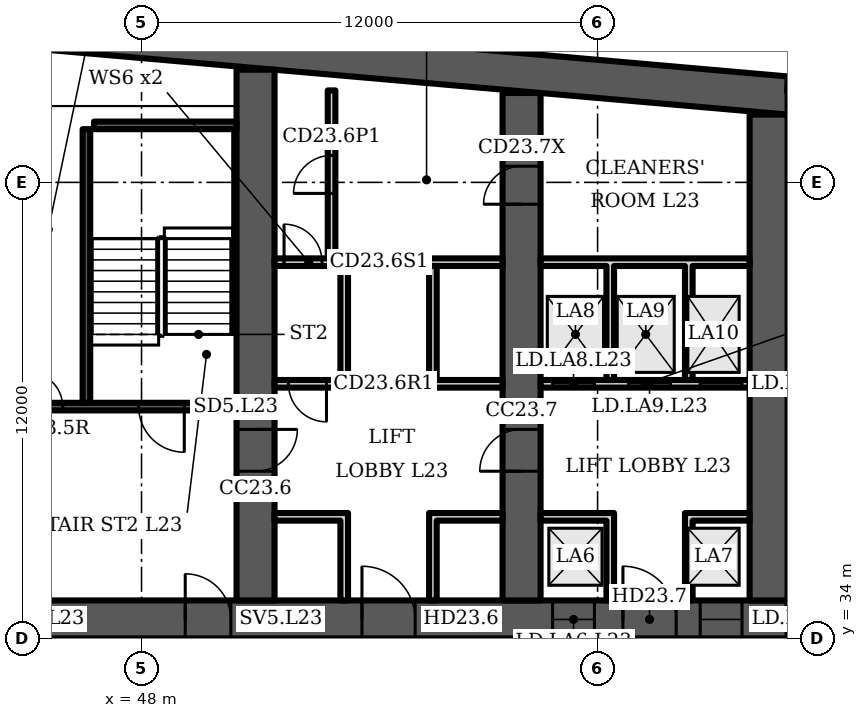
"""IFC4 building model, lengths in metres.
Left out: names, types, materials, properties, quantities, classifications, styles, units other than length and angle.
Written with IfcOpenShell. Run it as: python <this file> out.ifc"""

import sys

from ifc_helpers import new_model, si_unit, direction, frame, frame_2d, origin, place, context, subcontext, project, spatial, polyline, rectangle, outline, extrude, element, fill, save


model = new_model("IFC4")
c1 = context("Model", 3, precision=1e-05, world=origin(), true_north=direction((0.0, 1.0)))
c2 = subcontext(c1, "Body", "Model", "MODEL_VIEW")
j1 = project(units=[si_unit("LENGTHUNIT", "METRE"), si_unit("PLANEANGLEUNIT", "RADIAN")], contexts=[c1])
p1 = place(None, origin())
s1 = spatial("IfcSite", under=j1, at=p1, CompositionType="ELEMENT")
p2 = place(p1, origin())
s2 = spatial("IfcBuilding", under=s1, at=p2, CompositionType="ELEMENT")
p3 = place(p2, frame((0.0, 0.0, 103.9)))
s3 = spatial("IfcBuildingStorey", under=s2, at=p3, CompositionType="ELEMENT", Elevation=103.9)
p4 = place(p3, origin())
e1 = element("IfcWall", 1, at=p4, inside=s3, PredefinedType="SHEAR", context=c2, shape_type="SweptSolid", body=[
    extrude(outline(polyline([(16.0, 47.784), (40.5, 49.927), (65.0, 47.784), (65.0, 48.787), (40.5, 50.931), (16.0, 48.787), (16.0, 47.784)])), origin(), (0.0, 0.0, 1.0), 3.6),
])
p5 = place(p3, frame((16.0, 34.5, 0.0), z_axis=(0.0, 0.0, 1.0), x_axis=(1.0, 0.0, 0.0)))
e2 = element("IfcWall", 2, at=p5, inside=s3, PredefinedType="SHEAR", context=c2, shape_type="SweptSolid", body=[
    extrude(rectangle(XDim=49.0, YDim=1.0, at=frame_2d((24.5, 0.0))), origin(), (0.0, 0.0, 1.0), 3.6),
])
p6 = place(p5, frame((1.2, 0.0, 0.0)))
e3 = element("IfcOpeningElement", 3, at=p6, cuts=e2, PredefinedType="OPENING", context=c2, shape_type="SweptSolid", body=[
    extrude(rectangle(XDim=1.1, YDim=2.1, at=frame_2d((0.55, 1.05))), frame((0.0, 0.51, 0.0), z_axis=(0.0, -1.0, 0.0), x_axis=(1.0, 0.0, 0.0)), (0.0, 0.0, 1.0), 1.02),
])
p7 = place(p5, frame((5.083, 0.0, 0.0)))
e4 = element("IfcOpeningElement", 4, at=p7, cuts=e2, PredefinedType="OPENING", context=c2, shape_type="SweptSolid", body=[
    extrude(rectangle(XDim=1.1, YDim=2.1, at=frame_2d((0.55, 1.05))), frame((0.0, 0.51, 0.0), z_axis=(0.0, -1.0, 0.0), x_axis=(1.0, 0.0, 0.0)), (0.0, 0.0, 1.0), 1.02),
])
p8 = place(p5, frame((2.933, 0.0, 0.0)))
e5 = element("IfcOpeningElement", 5, at=p8, cuts=e2, PredefinedType="OPENING", context=c2, shape_type="SweptSolid", body=[
    extrude(rectangle(XDim=1.4, YDim=2.1, at=frame_2d((0.7, 1.05))), frame((0.0, 0.51, 0.0), z_axis=(0.0, -1.0, 0.0), x_axis=(1.0, 0.0, 0.0)), (0.0, 0.0, 1.0), 1.02),
])
p9 = place(p5, frame((7.65, 0.0, 0.0)))
e6 = element("IfcOpeningElement", 6, at=p9, cuts=e2, PredefinedType="OPENING", context=c2, shape_type="SweptSolid", body=[
    extrude(rectangle(XDim=1.2, YDim=2.1, at=frame_2d((0.6, 1.05))), frame((0.0, 0.51, 0.0), z_axis=(0.0, -1.0, 0.0), x_axis=(1.0, 0.0, 0.0)), (0.0, 0.0, 1.0), 1.02),
])
p10 = place(p5, frame((14.817, 0.0, 0.0)))
e7 = element("IfcOpeningElement", 7, at=p10, cuts=e2, PredefinedType="OPENING", context=c2, shape_type="SweptSolid", body=[
    extrude(rectangle(XDim=1.1, YDim=2.1, at=frame_2d((0.55, 1.05))), frame((0.0, 0.51, 0.0), z_axis=(0.0, -1.0, 0.0), x_axis=(1.0, 0.0, 0.0)), (0.0, 0.0, 1.0), 1.02),
])
p11 = place(p5, frame((19.083, 0.0, 0.0)))
e8 = element("IfcOpeningElement", 8, at=p11, cuts=e2, PredefinedType="OPENING", context=c2, shape_type="SweptSolid", body=[
    extrude(rectangle(XDim=1.1, YDim=2.1, at=frame_2d((0.55, 1.05))), frame((0.0, 0.51, 0.0), z_axis=(0.0, -1.0, 0.0), x_axis=(1.0, 0.0, 0.0)), (0.0, 0.0, 1.0), 1.02),
])
p12 = place(p5, frame((16.8, 0.0, 0.0)))
e9 = element("IfcOpeningElement", 9, at=p12, cuts=e2, PredefinedType="OPENING", context=c2, shape_type="SweptSolid", body=[
    extrude(rectangle(XDim=1.4, YDim=2.1, at=frame_2d((0.7, 1.05))), frame((0.0, 0.51, 0.0), z_axis=(0.0, -1.0, 0.0), x_axis=(1.0, 0.0, 0.0)), (0.0, 0.0, 1.0), 1.02),
])
p13 = place(p5, frame((21.817, 0.0, 0.0)))
e10 = element("IfcOpeningElement", 10, at=p13, cuts=e2, PredefinedType="OPENING", context=c2, shape_type="SweptSolid", body=[
    extrude(rectangle(XDim=1.1, YDim=2.1, at=frame_2d((0.55, 1.05))), frame((0.0, 0.51, 0.0), z_axis=(0.0, -1.0, 0.0), x_axis=(1.0, 0.0, 0.0)), (0.0, 0.0, 1.0), 1.02),
])
p14 = place(p5, frame((26.083, 0.0, 0.0)))
e11 = element("IfcOpeningElement", 11, at=p14, cuts=e2, PredefinedType="OPENING", context=c2, shape_type="SweptSolid", body=[
    extrude(rectangle(XDim=1.1, YDim=2.1, at=frame_2d((0.55, 1.05))), frame((0.0, 0.51, 0.0), z_axis=(0.0, -1.0, 0.0), x_axis=(1.0, 0.0, 0.0)), (0.0, 0.0, 1.0), 1.02),
])
p15 = place(p5, frame((33.15, 0.0, 0.0)))
e12 = element("IfcOpeningElement", 12, at=p15, cuts=e2, PredefinedType="OPENING", context=c2, shape_type="SweptSolid", body=[
    extrude(rectangle(XDim=1.2, YDim=2.1, at=frame_2d((0.6, 1.05))), frame((0.0, 0.51, 0.0), z_axis=(0.0, -1.0, 0.0), x_axis=(1.0, 0.0, 0.0)), (0.0, 0.0, 1.0), 1.02),
])
p16 = place(p5, frame((37.8, 0.0, 0.0)))
e13 = element("IfcOpeningElement", 13, at=p16, cuts=e2, PredefinedType="OPENING", context=c2, shape_type="SweptSolid", body=[
    extrude(rectangle(XDim=1.4, YDim=2.1, at=frame_2d((0.7, 1.05))), frame((0.0, 0.51, 0.0), z_axis=(0.0, -1.0, 0.0), x_axis=(1.0, 0.0, 0.0)), (0.0, 0.0, 1.0), 1.02),
])
p17 = place(p5, frame((42.817, 0.0, 0.0)))
e14 = element("IfcOpeningElement", 14, at=p17, cuts=e2, PredefinedType="OPENING", context=c2, shape_type="SweptSolid", body=[
    extrude(rectangle(XDim=1.1, YDim=2.1, at=frame_2d((0.55, 1.05))), frame((0.0, 0.51, 0.0), z_axis=(0.0, -1.0, 0.0), x_axis=(1.0, 0.0, 0.0)), (0.0, 0.0, 1.0), 1.02),
])
p18 = place(p5, frame((46.7, 0.0, 0.0)))
e15 = element("IfcOpeningElement", 15, at=p18, cuts=e2, PredefinedType="OPENING", context=c2, shape_type="SweptSolid", body=[
    extrude(rectangle(XDim=1.1, YDim=2.1, at=frame_2d((0.55, 1.05))), frame((0.0, 0.51, 0.0), z_axis=(0.0, -1.0, 0.0), x_axis=(1.0, 0.0, 0.0)), (0.0, 0.0, 1.0), 1.02),
])
p19 = place(p5, frame((44.667, 0.0, 0.0)))
e16 = element("IfcOpeningElement", 16, at=p19, cuts=e2, PredefinedType="OPENING", context=c2, shape_type="SweptSolid", body=[
    extrude(rectangle(XDim=1.4, YDim=2.1, at=frame_2d((0.7, 1.05))), frame((0.0, 0.51, 0.0), z_axis=(0.0, -1.0, 0.0), x_axis=(1.0, 0.0, 0.0)), (0.0, 0.0, 1.0), 1.02),
])
p20 = place(p3, frame((51.0, 35.0, 0.0), z_axis=(0.0, 0.0, 1.0), x_axis=(0.0, 1.0, 0.0)))
e17 = element("IfcWall", 17, at=p20, inside=s3, PredefinedType="SHEAR", context=c2, shape_type="SweptSolid", body=[
    extrude(rectangle(XDim=13.965, YDim=1.0, at=frame_2d((6.982, 0.0))), origin(), (0.0, 0.0, 1.0), 3.6),
])
p21 = place(p20, frame((3.4, 0.0, 0.0)))
e18 = element("IfcOpeningElement", 18, at=p21, cuts=e17, PredefinedType="OPENING", context=c2, shape_type="SweptSolid", body=[
    extrude(rectangle(XDim=1.1, YDim=2.1, at=frame_2d((0.55, 1.05))), frame((0.0, 0.51, 0.0), z_axis=(0.0, -1.0, 0.0), x_axis=(1.0, 0.0, 0.0)), (0.0, 0.0, 1.0), 1.02),
])
p22 = place(p3, frame((58.0, 35.0, 0.0), z_axis=(0.0, 0.0, 1.0), x_axis=(0.0, 1.0, 0.0)))
e19 = element("IfcWall", 19, at=p22, inside=s3, PredefinedType="SHEAR", context=c2, shape_type="SweptSolid", body=[
    extrude(rectangle(XDim=13.352, YDim=1.0, at=frame_2d((6.676, 0.0))), origin(), (0.0, 0.0, 1.0), 3.6),
])
p23 = place(p22, frame((10.426, 0.0, 0.0)))
e20 = element("IfcOpeningElement", 20, at=p23, cuts=e19, PredefinedType="OPENING", context=c2, shape_type="SweptSolid", body=[
    extrude(rectangle(XDim=1.0, YDim=2.1, at=frame_2d((0.5, 1.05))), frame((0.0, 0.51, 0.0), z_axis=(0.0, -1.0, 0.0), x_axis=(1.0, 0.0, 0.0)), (0.0, 0.0, 1.0), 1.02),
])
p24 = place(p22, frame((3.4, 0.0, 0.0)))
e21 = element("IfcOpeningElement", 21, at=p24, cuts=e19, PredefinedType="OPENING", context=c2, shape_type="SweptSolid", body=[
    extrude(rectangle(XDim=1.1, YDim=2.1, at=frame_2d((0.55, 1.05))), frame((0.0, 0.51, 0.0), z_axis=(0.0, -1.0, 0.0), x_axis=(1.0, 0.0, 0.0)), (0.0, 0.0, 1.0), 1.02),
])
p25 = place(p3, frame((64.5, 35.0, 0.0), z_axis=(0.0, 0.0, 1.0), x_axis=(0.0, 1.0, 0.0)))
e22 = element("IfcWall", 22, at=p25, inside=s3, PredefinedType="SHEAR", context=c2, shape_type="SweptSolid", body=[
    extrude(rectangle(XDim=12.784, YDim=1.0, at=frame_2d((6.392, 0.0))), origin(), (0.0, 0.0, 1.0), 3.6),
])
p26 = place(p3, frame((67.983, 48.326, 0.0), z_axis=(0.0, 0.0, 1.0), x_axis=(-0.996194, 0.087168, 0.0)))
e23 = element("IfcWall", 23, at=p26, inside=s3, PredefinedType="SOLIDWALL", context=c2, shape_type="SweptSolid", body=[
    extrude(rectangle(XDim=2.994, YDim=0.4, at=frame_2d((1.497, 0.0))), origin(), (0.0, 0.0, 1.0), 3.2),
])
p27 = place(p3, frame((44.5, 40.1, 0.0), z_axis=(0.0, 0.0, 1.0), x_axis=(1.0, 0.0, 0.0)))
e24 = element("IfcWall", 24, at=p27, inside=s3, PredefinedType="SHEAR", context=c2, shape_type="SweptSolid", body=[
    extrude(rectangle(XDim=6.0, YDim=0.2, at=frame_2d((3.0, 0.0))), origin(), (0.0, 0.0, 1.0), 3.2),
])
p28 = place(p27, frame((3.425, 0.0, 0.0)))
e25 = element("IfcOpeningElement", 25, at=p28, cuts=e24, PredefinedType="OPENING", context=c2, shape_type="SweptSolid", body=[
    extrude(rectangle(XDim=1.2, YDim=2.1, at=frame_2d((0.6, 1.05))), frame((0.0, 0.11, 0.0), z_axis=(0.0, -1.0, 0.0), x_axis=(1.0, 0.0, 0.0)), (0.0, 0.0, 1.0), 0.22),
])
p29 = place(p27, frame((0.525, 0.0, 0.0)))
e26 = element("IfcOpeningElement", 26, at=p29, cuts=e24, PredefinedType="OPENING", context=c2, shape_type="SweptSolid", body=[
    extrude(rectangle(XDim=0.9, YDim=2.1, at=frame_2d((0.45, 1.05))), frame((0.0, 0.11, 0.0), z_axis=(0.0, -1.0, 0.0), x_axis=(1.0, 0.0, 0.0)), (0.0, 0.0, 1.0), 0.22),
])
p30 = place(p3, frame((46.55, 40.2, 0.0), z_axis=(0.0, 0.0, 1.0), x_axis=(0.0, 1.0, 0.0)))
e27 = element("IfcWall", 27, at=p30, inside=s3, PredefinedType="SHEAR", context=c2, shape_type="SweptSolid", body=[
    extrude(rectangle(XDim=7.2, YDim=0.2, at=frame_2d((3.6, 0.0))), origin(), (0.0, 0.0, 1.0), 3.2),
])
p31 = place(p3, frame((46.75, 47.5, 0.0), z_axis=(0.0, 0.0, 1.0), x_axis=(1.0, 0.0, 0.0)))
e28 = element("IfcWall", 28, at=p31, inside=s3, PredefinedType="SHEAR", context=c2, shape_type="SweptSolid", body=[
    extrude(rectangle(XDim=3.75, YDim=0.2, at=frame_2d((1.875, 0.0))), origin(), (0.0, 0.0, 1.0), 3.2),
])
p32 = place(p3, frame((51.5, 40.7, 0.0), z_axis=(0.0, 0.0, 1.0), x_axis=(1.0, 0.0, 0.0)))
e29 = element("IfcWall", 29, at=p32, inside=s3, PredefinedType="PARTITIONING", context=c2, shape_type="SweptSolid", body=[
    extrude(rectangle(XDim=6.0, YDim=0.2, at=frame_2d((3.0, 0.0))), origin(), (0.0, 0.0, 1.0), 3.2),
])
p33 = place(p32, frame((0.367, 0.0, 0.0)))
e30 = element("IfcOpeningElement", 30, at=p33, cuts=e29, PredefinedType="OPENING", context=c2, shape_type="SweptSolid", body=[
    extrude(rectangle(XDim=1.0, YDim=2.1, at=frame_2d((0.5, 1.05))), frame((0.0, 0.11, 0.0), z_axis=(0.0, -1.0, 0.0), x_axis=(1.0, 0.0, 0.0)), (0.0, 0.0, 1.0), 0.22),
])
p34 = place(p3, frame((51.5, 43.9, 0.0), z_axis=(0.0, 0.0, 1.0), x_axis=(1.0, 0.0, 0.0)))
e31 = element("IfcWall", 31, at=p34, inside=s3, PredefinedType="PARTITIONING", context=c2, shape_type="SweptSolid", body=[
    extrude(rectangle(XDim=6.0, YDim=0.2, at=frame_2d((3.0, 0.0))), origin(), (0.0, 0.0, 1.0), 3.2),
])
p35 = place(p34, frame((0.25, 0.0, 0.0)))
e32 = element("IfcOpeningElement", 32, at=p35, cuts=e31, PredefinedType="OPENING", context=c2, shape_type="SweptSolid", body=[
    extrude(rectangle(XDim=1.0, YDim=2.1, at=frame_2d((0.5, 1.05))), frame((0.0, 0.11, 0.0), z_axis=(0.0, -1.0, 0.0), x_axis=(1.0, 0.0, 0.0)), (0.0, 0.0, 1.0), 0.22),
])
p36 = place(p3, origin())
e33 = element("IfcWall", 33, at=p36, inside=s3, PredefinedType="PARTITIONING", context=c2, shape_type="SweptSolid", body=[
    extrude(outline(polyline([(53.233, 37.1), (51.5, 37.1), (51.5, 37.3), (53.233, 37.3), (53.433, 37.3), (53.433, 35.0), (53.233, 35.0), (53.233, 37.1)])), origin(), (0.0, 0.0, 1.0), 3.2),
])
p37 = place(p3, origin())
e34 = element("IfcWall", 34, at=p37, inside=s3, PredefinedType="PARTITIONING", context=c2, shape_type="SweptSolid", body=[
    extrude(outline(polyline([(55.567, 37.3), (55.767, 37.3), (57.5, 37.3), (57.5, 37.1), (55.767, 37.1), (55.767, 35.0), (55.567, 35.0), (55.567, 37.3)])), origin(), (0.0, 0.0, 1.0), 3.2),
])
p38 = place(p3, origin())
e35 = element("IfcWall", 35, at=p38, inside=s3, PredefinedType="PARTITIONING", context=c2, shape_type="SweptSolid", body=[
    extrude(outline(polyline([(53.233, 40.8), (53.233, 43.8), (53.433, 43.8), (53.433, 40.8), (53.233, 40.8)])), origin(), (0.0, 0.0, 1.0), 3.2),
])
p39 = place(p3, origin())
e36 = element("IfcWall", 36, at=p39, inside=s3, PredefinedType="PARTITIONING", context=c2, shape_type="SweptSolid", body=[
    extrude(outline(polyline([(55.567, 40.8), (55.567, 43.8), (55.767, 43.8), (55.767, 40.8), (55.567, 40.8)])), origin(), (0.0, 0.0, 1.0), 3.2),
])
p40 = place(p3, frame((53.0, 44.0, 0.0), z_axis=(0.0, 0.0, 1.0), x_axis=(0.0, 1.0, 0.0)))
e37 = element("IfcWall", 37, at=p40, inside=s3, PredefinedType="PARTITIONING", context=c2, shape_type="SweptSolid", body=[
    extrude(rectangle(XDim=4.42, YDim=0.2, at=frame_2d((2.21, 0.0))), origin(), (0.0, 0.0, 1.0), 3.2),
])
p41 = place(p40, frame((1.71, 0.0, 0.0)))
e38 = element("IfcOpeningElement", 38, at=p41, cuts=e37, PredefinedType="OPENING", context=c2, shape_type="SweptSolid", body=[
    extrude(rectangle(XDim=1.0, YDim=2.1, at=frame_2d((0.5, 1.05))), frame((0.0, 0.11, 0.0), z_axis=(0.0, -1.0, 0.0), x_axis=(1.0, 0.0, 0.0)), (0.0, 0.0, 1.0), 0.22),
])
p42 = place(p3, frame((58.5, 40.7, 0.0), z_axis=(0.0, 0.0, 1.0), x_axis=(1.0, 0.0, 0.0)))
e39 = element("IfcWall", 39, at=p42, inside=s3, PredefinedType="PARTITIONING", context=c2, shape_type="SweptSolid", body=[
    extrude(rectangle(XDim=5.5, YDim=0.2, at=frame_2d((2.75, 0.0))), origin(), (0.0, 0.0, 1.0), 3.2),
])
p43 = place(p42, frame((0.317, 0.0, 0.0)))
e40 = element("IfcOpeningElement", 40, at=p43, cuts=e39, PredefinedType="OPENING", context=c2, shape_type="SweptSolid", body=[
    extrude(rectangle(XDim=1.1, YDim=2.1, at=frame_2d((0.55, 1.05))), frame((0.0, 0.11, 0.0), z_axis=(0.0, -1.0, 0.0), x_axis=(1.0, 0.0, 0.0)), (0.0, 0.0, 1.0), 0.22),
])
p44 = place(p42, frame((2.317, 0.0, 0.0)))
e41 = element("IfcOpeningElement", 41, at=p44, cuts=e39, PredefinedType="OPENING", context=c2, shape_type="SweptSolid", body=[
    extrude(rectangle(XDim=1.1, YDim=2.1, at=frame_2d((0.55, 1.05))), frame((0.0, 0.11, 0.0), z_axis=(0.0, -1.0, 0.0), x_axis=(1.0, 0.0, 0.0)), (0.0, 0.0, 1.0), 0.22),
])
p45 = place(p42, frame((4.2, 0.0, 0.0)))
e42 = element("IfcOpeningElement", 42, at=p45, cuts=e39, PredefinedType="OPENING", context=c2, shape_type="SweptSolid", body=[
    extrude(rectangle(XDim=1.1, YDim=2.1, at=frame_2d((0.55, 1.05))), frame((0.0, 0.11, 0.0), z_axis=(0.0, -1.0, 0.0), x_axis=(1.0, 0.0, 0.0)), (0.0, 0.0, 1.0), 0.22),
])
p46 = place(p3, origin())
e43 = element("IfcWall", 43, at=p46, inside=s3, PredefinedType="PARTITIONING", context=c2, shape_type="SweptSolid", body=[
    extrude(outline(polyline([(60.233, 37.1), (58.5, 37.1), (58.5, 37.3), (60.233, 37.3), (60.433, 37.3), (60.433, 35.0), (60.233, 35.0), (60.233, 37.1)])), origin(), (0.0, 0.0, 1.0), 3.2),
])
p47 = place(p3, origin())
e44 = element("IfcWall", 44, at=p47, inside=s3, PredefinedType="PARTITIONING", context=c2, shape_type="SweptSolid", body=[
    extrude(outline(polyline([(62.3, 37.3), (62.5, 37.3), (64.0, 37.3), (64.0, 37.1), (62.5, 37.1), (62.5, 35.0), (62.3, 35.0), (62.3, 37.3)])), origin(), (0.0, 0.0, 1.0), 3.2),
])
p48 = place(p3, origin())
e45 = element("IfcWall", 45, at=p48, inside=s3, PredefinedType="PARTITIONING", context=c2, shape_type="SweptSolid", body=[
    extrude(outline(polyline([(60.433, 40.8), (60.233, 40.8), (60.233, 43.8), (58.5, 43.8), (58.5, 44.0), (64.0, 44.0), (64.0, 43.8), (62.5, 43.8), (62.5, 40.8), (62.3, 40.8), (62.3, 43.8), (60.433, 43.8), (60.433, 40.8)])), origin(), (0.0, 0.0, 1.0), 3.2),
])
p49 = place(p28, origin())
e46 = element("IfcDoor", 46, at=p49, inside=s3, OperationType="SINGLE_SWING_RIGHT", PredefinedType="DOOR", context=c2, shape_type="SweptSolid", body=[
    extrude(rectangle(XDim=1.2, YDim=2.1, at=frame_2d((0.6, 1.05))), frame((0.0, 0.025, 0.0), z_axis=(0.0, -1.0, 0.0), x_axis=(1.0, 0.0, 0.0)), (0.0, 0.0, 1.0), 0.05),
])
fill(e25, e46)
p50 = place(p29, origin())
e47 = element("IfcDoor", 47, at=p50, inside=s3, OperationType="SINGLE_SWING_LEFT", PredefinedType="DOOR", context=c2, shape_type="SweptSolid", body=[
    extrude(rectangle(XDim=0.9, YDim=2.1, at=frame_2d((0.45, 1.05))), frame((0.0, 0.025, 0.0), z_axis=(0.0, -1.0, 0.0), x_axis=(1.0, 0.0, 0.0)), (0.0, 0.0, 1.0), 0.05),
])
fill(e26, e47)
p51 = place(p15, origin())
e48 = element("IfcDoor", 48, at=p51, inside=s3, OperationType="SINGLE_SWING_LEFT", PredefinedType="DOOR", context=c2, shape_type="SweptSolid", body=[
    extrude(rectangle(XDim=1.2, YDim=2.1, at=frame_2d((0.6, 1.05))), frame((0.0, 0.025, 0.0), z_axis=(0.0, -1.0, 0.0), x_axis=(1.0, 0.0, 0.0)), (0.0, 0.0, 1.0), 0.05),
])
fill(e12, e48)
p52 = place(p16, origin())
e49 = element("IfcDoor", 49, at=p52, inside=s3, OperationType="DOUBLE_DOOR_SINGLE_SWING", PredefinedType="DOOR", context=c2, shape_type="SweptSolid", body=[
    extrude(rectangle(XDim=1.4, YDim=2.1, at=frame_2d((0.7, 1.05))), frame((0.0, 0.025, 0.0), z_axis=(0.0, -1.0, 0.0), x_axis=(1.0, 0.0, 0.0)), (0.0, 0.0, 1.0), 0.05),
])
fill(e13, e49)
p53 = place(p33, origin())
e50 = element("IfcDoor", 50, at=p53, inside=s3, OperationType="SINGLE_SWING_RIGHT", PredefinedType="DOOR", context=c2, shape_type="SweptSolid", body=[
    extrude(rectangle(XDim=1.0, YDim=2.1, at=frame_2d((0.5, 1.05))), frame((0.0, 0.025, 0.0), z_axis=(0.0, -1.0, 0.0), x_axis=(1.0, 0.0, 0.0)), (0.0, 0.0, 1.0), 0.05),
])
fill(e30, e50)
p54 = place(p35, origin())
e51 = element("IfcDoor", 51, at=p54, inside=s3, OperationType="SINGLE_SWING_LEFT", PredefinedType="DOOR", context=c2, shape_type="SweptSolid", body=[
    extrude(rectangle(XDim=1.0, YDim=2.1, at=frame_2d((0.5, 1.05))), frame((0.0, 0.025, 0.0), z_axis=(0.0, -1.0, 0.0), x_axis=(1.0, 0.0, 0.0)), (0.0, 0.0, 1.0), 0.05),
])
fill(e32, e51)
p55 = place(p41, origin())
e52 = element("IfcDoor", 52, at=p55, inside=s3, OperationType="SINGLE_SWING_LEFT", PredefinedType="DOOR", context=c2, shape_type="SweptSolid", body=[
    extrude(rectangle(XDim=1.0, YDim=2.1, at=frame_2d((0.5, 1.05))), frame((0.0, 0.025, 0.0), z_axis=(0.0, -1.0, 0.0), x_axis=(1.0, 0.0, 0.0)), (0.0, 0.0, 1.0), 0.05),
])
fill(e38, e52)
p56 = place(p17, origin())
e53 = element("IfcDoor", 53, at=p56, inside=s3, OperationType="DOUBLE_DOOR_SLIDING", PredefinedType="DOOR", context=c2, shape_type="SweptSolid", body=[
    extrude(rectangle(XDim=1.1, YDim=2.1, at=frame_2d((0.55, 1.05))), frame((0.0, 0.025, 0.0), z_axis=(0.0, -1.0, 0.0), x_axis=(1.0, 0.0, 0.0)), (0.0, 0.0, 1.0), 0.05),
])
fill(e14, e53)
p57 = place(p18, origin())
e54 = element("IfcDoor", 54, at=p57, inside=s3, OperationType="DOUBLE_DOOR_SLIDING", PredefinedType="DOOR", context=c2, shape_type="SweptSolid", body=[
    extrude(rectangle(XDim=1.1, YDim=2.1, at=frame_2d((0.55, 1.05))), frame((0.0, 0.025, 0.0), z_axis=(0.0, -1.0, 0.0), x_axis=(1.0, 0.0, 0.0)), (0.0, 0.0, 1.0), 0.05),
])
fill(e15, e54)
p58 = place(p19, origin())
e55 = element("IfcDoor", 55, at=p58, inside=s3, OperationType="DOUBLE_DOOR_SINGLE_SWING", PredefinedType="DOOR", context=c2, shape_type="SweptSolid", body=[
    extrude(rectangle(XDim=1.4, YDim=2.1, at=frame_2d((0.7, 1.05))), frame((0.0, 0.025, 0.0), z_axis=(0.0, -1.0, 0.0), x_axis=(1.0, 0.0, 0.0)), (0.0, 0.0, 1.0), 0.05),
])
fill(e16, e55)
p59 = place(p43, origin())
e56 = element("IfcDoor", 56, at=p59, inside=s3, OperationType="DOUBLE_DOOR_SLIDING", PredefinedType="DOOR", context=c2, shape_type="SweptSolid", body=[
    extrude(rectangle(XDim=1.1, YDim=2.1, at=frame_2d((0.55, 1.05))), frame((0.0, 0.025, 0.0), z_axis=(0.0, -1.0, 0.0), x_axis=(1.0, 0.0, 0.0)), (0.0, 0.0, 1.0), 0.05),
])
fill(e40, e56)
p60 = place(p44, origin())
e57 = element("IfcDoor", 57, at=p60, inside=s3, OperationType="DOUBLE_DOOR_SLIDING", PredefinedType="DOOR", context=c2, shape_type="SweptSolid", body=[
    extrude(rectangle(XDim=1.1, YDim=2.1, at=frame_2d((0.55, 1.05))), frame((0.0, 0.025, 0.0), z_axis=(0.0, -1.0, 0.0), x_axis=(1.0, 0.0, 0.0)), (0.0, 0.0, 1.0), 0.05),
])
fill(e41, e57)
p61 = place(p45, origin())
e58 = element("IfcDoor", 58, at=p61, inside=s3, OperationType="DOUBLE_DOOR_SLIDING", PredefinedType="DOOR", context=c2, shape_type="SweptSolid", body=[
    extrude(rectangle(XDim=1.1, YDim=2.1, at=frame_2d((0.55, 1.05))), frame((0.0, 0.025, 0.0), z_axis=(0.0, -1.0, 0.0), x_axis=(1.0, 0.0, 0.0)), (0.0, 0.0, 1.0), 0.05),
])
fill(e42, e58)
p62 = place(p23, origin())
e59 = element("IfcDoor", 59, at=p62, inside=s3, OperationType="SINGLE_SWING_LEFT", PredefinedType="DOOR", context=c2, shape_type="SweptSolid", body=[
    extrude(rectangle(XDim=1.0, YDim=2.1, at=frame_2d((0.5, 1.05))), frame((0.0, 0.5, 0.0), z_axis=(0.0, -1.0, 0.0), x_axis=(1.0, 0.0, 0.0)), (0.0, 0.0, 1.0), 1.0),
])
fill(e20, e59)
p63 = place(p21, origin())
e60 = element("IfcDoor", 60, at=p63, inside=s3, OperationType="SINGLE_SWING_RIGHT", PredefinedType="DOOR", context=c2, shape_type="SweptSolid", body=[
    extrude(rectangle(XDim=1.1, YDim=2.1, at=frame_2d((0.55, 1.05))), frame((0.0, 0.025, 0.0), z_axis=(0.0, -1.0, 0.0), x_axis=(1.0, 0.0, 0.0)), (0.0, 0.0, 1.0), 0.05),
])
fill(e18, e60)
p64 = place(p24, origin())
e61 = element("IfcDoor", 61, at=p64, inside=s3, OperationType="SINGLE_SWING_LEFT", PredefinedType="DOOR", context=c2, shape_type="SweptSolid", body=[
    extrude(rectangle(XDim=1.1, YDim=2.1, at=frame_2d((0.55, 1.05))), frame((0.0, 0.025, 0.0), z_axis=(0.0, -1.0, 0.0), x_axis=(1.0, 0.0, 0.0)), (0.0, 0.0, 1.0), 0.05),
])
fill(e21, e61)
save(model, sys.argv[1])
